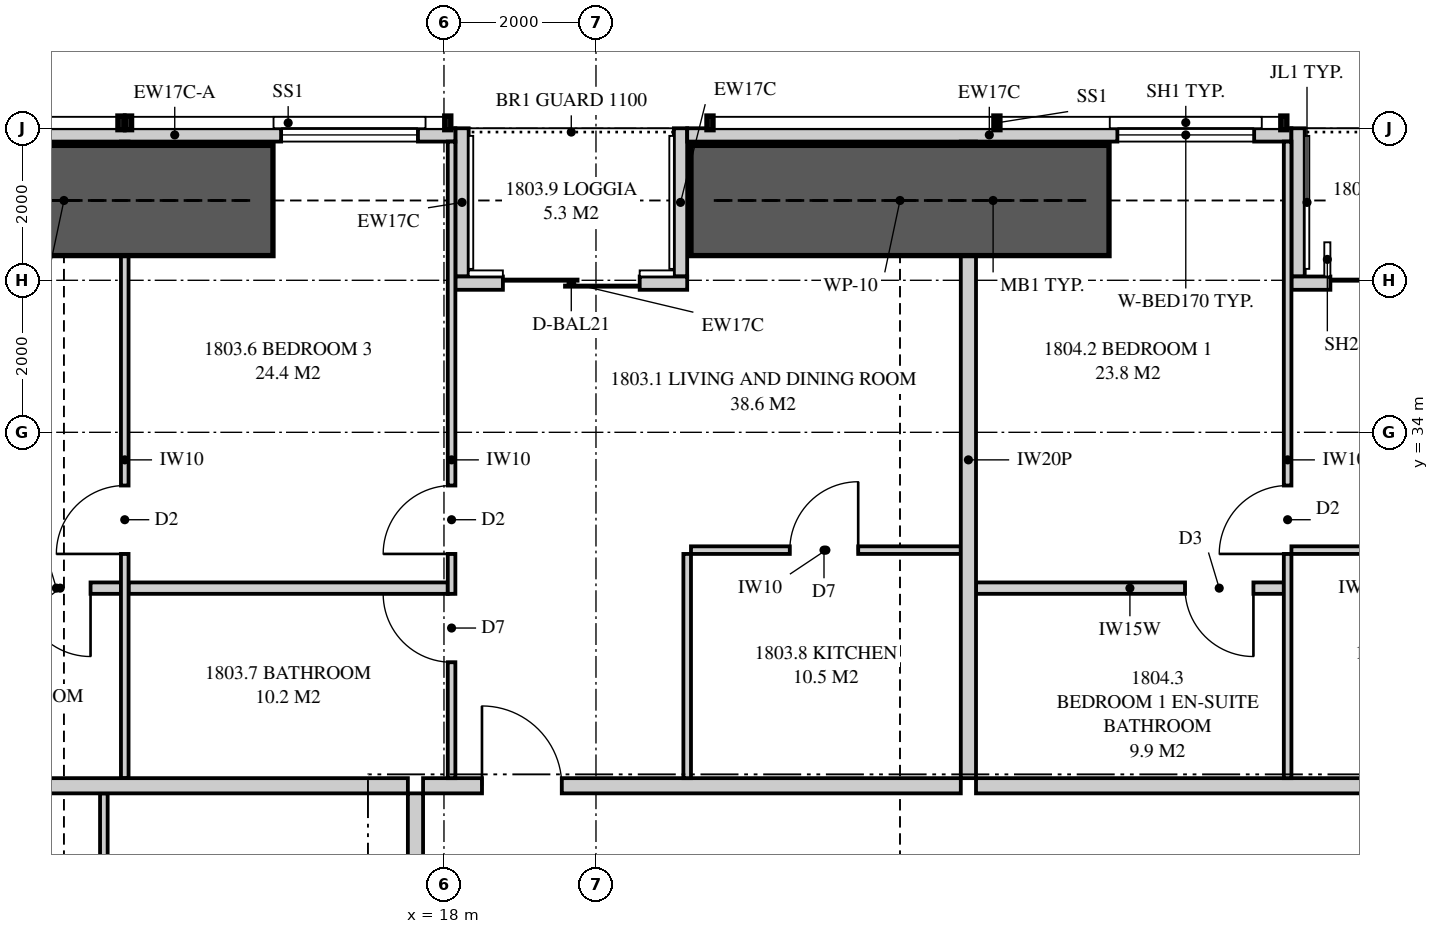
"""IFC4 building model, lengths in metres.
Left out: names, types, materials, properties, quantities, classifications, styles, units other than length and angle.
Written with IfcOpenShell. Run it as: python <this file> out.ifc"""

import sys

from ifc_helpers import new_model, si_unit, direction, frame, frame_2d, origin, place, context, subcontext, project, spatial, polyline, rectangle, outline, extrude, element, fill, save


model = new_model("IFC4")
c1 = context("Model", 3, precision=1e-05, world=origin(), true_north=direction((0.0, 1.0)))
c2 = subcontext(c1, "Body", "Model", "MODEL_VIEW")
j1 = project(units=[si_unit("LENGTHUNIT", "METRE"), si_unit("PLANEANGLEUNIT", "RADIAN")], contexts=[c1])
p1 = place(None, origin())
s1 = spatial("IfcSite", under=j1, at=p1, CompositionType="ELEMENT")
p2 = place(p1, origin())
s2 = spatial("IfcBuilding", under=s1, at=p2, CompositionType="ELEMENT")
p3 = place(p2, frame((0.0, 0.0, 67.9)))
s3 = spatial("IfcBuildingStorey", under=s2, at=p3, CompositionType="ELEMENT", Elevation=67.9)
p4 = place(p3, frame((29.15, 37.913, 0.0), z_axis=(0.0, 0.0, 1.0), x_axis=(-1.0, 0.0, 0.0)))
e1 = element("IfcWall", 1, at=p4, inside=s3, PredefinedType="SOLIDWALL", context=c2, shape_type="SweptSolid", body=[
    extrude(rectangle(XDim=7.95, YDim=0.175, at=frame_2d((3.975, 0.0))), origin(), (0.0, 0.0, 1.0), 2.15),
])
p5 = place(p4, frame((0.49, 0.0, 0.4)))
e2 = element("IfcOpeningElement", 2, at=p5, cuts=e1, PredefinedType="OPENING", context=c2, shape_type="SweptSolid", body=[
    extrude(rectangle(XDim=1.8, YDim=1.7, at=frame_2d((0.9, 0.85))), frame((0.0, 0.097, 0.0), z_axis=(0.0, -1.0, 0.0), x_axis=(1.0, 0.0, 0.0)), (0.0, 0.0, 1.0), 0.195),
])
p6 = place(p3, frame((18.15, 37.913, 0.0), z_axis=(0.0, 0.0, 1.0), x_axis=(-1.0, 0.0, 0.0)))
e3 = element("IfcWall", 3, at=p6, inside=s3, PredefinedType="SOLIDWALL", context=c2, shape_type="SweptSolid", body=[
    extrude(rectangle(XDim=7.385, YDim=0.175, at=frame_2d((3.692, 0.0))), origin(), (0.0, 0.0, 1.0), 2.15),
])
p7 = place(p6, frame((0.492, 0.0, 0.4)))
e4 = element("IfcOpeningElement", 4, at=p7, cuts=e3, PredefinedType="OPENING", context=c2, shape_type="SweptSolid", body=[
    extrude(rectangle(XDim=1.8, YDim=1.7, at=frame_2d((0.9, 0.85))), frame((0.0, 0.097, 0.0), z_axis=(0.0, -1.0, 0.0), x_axis=(1.0, 0.0, 0.0)), (0.0, 0.0, 1.0), 0.195),
])
p8 = place(p3, frame((31.975, 35.962, 0.0), z_axis=(0.0, 0.0, 1.0), x_axis=(-1.0, 0.0, 0.0)))
e5 = element("IfcWall", 5, at=p8, inside=s3, PredefinedType="SOLIDWALL", context=c2, shape_type="SweptSolid", body=[
    extrude(rectangle(XDim=2.825, YDim=0.175, at=frame_2d((1.413, 0.0))), origin(), (0.0, 0.0, 1.0), 2.15),
])
p9 = place(p8, frame((0.512, 0.0, 0.0)))
e6 = element("IfcOpeningElement", 6, at=p9, cuts=e5, PredefinedType="OPENING", context=c2, shape_type="SweptSolid", body=[
    extrude(rectangle(XDim=1.8, YDim=2.1, at=frame_2d((0.9, 1.05))), frame((0.0, 0.097, 0.0), z_axis=(0.0, -1.0, 0.0), x_axis=(1.0, 0.0, 0.0)), (0.0, 0.0, 1.0), 0.195),
])
p10 = place(p3, frame((29.238, 38.0, 0.0), z_axis=(0.0, 0.0, 1.0), x_axis=(0.0, -1.0, 0.0)))
e7 = element("IfcWall", 7, at=p10, inside=s3, PredefinedType="SOLIDWALL", context=c2, shape_type="SweptSolid", body=[
    extrude(rectangle(XDim=1.95, YDim=0.175, at=frame_2d((0.975, 0.0))), origin(), (0.0, 0.0, 1.0), 2.15),
])
p11 = place(p3, frame((21.2, 35.962, 0.0), z_axis=(0.0, 0.0, 1.0), x_axis=(-1.0, 0.0, 0.0)))
e8 = element("IfcWall", 8, at=p11, inside=s3, PredefinedType="SOLIDWALL", context=c2, shape_type="SweptSolid", body=[
    extrude(rectangle(XDim=3.05, YDim=0.175, at=frame_2d((1.525, 0.0))), origin(), (0.0, 0.0, 1.0), 2.15),
])
p12 = place(p11, frame((0.625, 0.0, 0.0)))
e9 = element("IfcOpeningElement", 9, at=p12, cuts=e8, PredefinedType="OPENING", context=c2, shape_type="SweptSolid", body=[
    extrude(rectangle(XDim=1.8, YDim=2.1, at=frame_2d((0.9, 1.05))), frame((0.0, 0.097, 0.0), z_axis=(0.0, -1.0, 0.0), x_axis=(1.0, 0.0, 0.0)), (0.0, 0.0, 1.0), 0.195),
])
for number, where, z_axis, x_axis in (
    (10, (21.113, 38.0, 0.0), (0.0, 0.0, 1.0), (0.0, -1.0, 0.0)),
    (11, (18.238, 38.0, 0.0), (0.0, 0.0, 1.0), (0.0, -1.0, 0.0)),
):
    element("IfcWall", number, at=place(p3, frame(where, z_axis=z_axis, x_axis=x_axis)), inside=s3, PredefinedType="SOLIDWALL", context=c2, shape_type="SweptSolid", body=[
        extrude(rectangle(XDim=1.95, YDim=0.175, at=frame_2d((0.975, 0.0))), origin(), (0.0, 0.0, 1.0), 2.15),
    ])
p13 = place(p3, frame((24.9, 37.825, 0.0), z_axis=(0.0, 0.0, 1.0), x_axis=(0.0, -1.0, 0.0)))
e12 = element("IfcWall", 12, at=p13, inside=s3, PredefinedType="PARTITIONING", context=c2, shape_type="SweptSolid", body=[
    extrude(outline(polyline([(0.529, 2.15), (0.0, 2.15), (0.0, 0.0), (0.529, 0.0), (0.529, 0.889), (1.021, 0.889), (1.021, 0.0), (8.375, 0.0), (8.375, 3.11), (2.085, 3.11), (2.085, 2.15), (1.021, 2.15), (1.021, 1.261), (0.529, 1.261), (0.529, 2.15)])), frame((0.0, 0.1, 0.0), z_axis=(0.0, -1.0, 0.0), x_axis=(1.0, 0.0, 0.0)), (0.0, 0.0, 1.0), 0.2),
])
p14 = place(p3, frame((17.725, 29.35, 0.0), z_axis=(0.0, 0.0, 1.0), x_axis=(1.0, 0.0, 0.0)))
e13 = element("IfcWall", 13, at=p14, inside=s3, PredefinedType="PARTITIONING", context=c2, shape_type="SweptSolid", body=[
    extrude(outline(polyline([(0.0, 0.0), (7.075, 0.0), (7.075, 3.11), (6.612, 3.11), (6.612, 2.541), (5.938, 2.541), (5.938, 3.11), (0.0, 3.11), (0.0, 0.0)])), frame((0.0, 0.1, 0.0), z_axis=(0.0, -1.0, 0.0), x_axis=(1.0, 0.0, 0.0)), (0.0, 0.0, 1.0), 0.2),
])
p15 = place(p14, frame((0.775, 0.0, 0.0)))
e14 = element("IfcOpeningElement", 14, at=p15, cuts=e13, PredefinedType="OPENING", context=c2, shape_type="SweptSolid", body=[
    extrude(rectangle(XDim=1.05, YDim=2.2, at=frame_2d((0.525, 1.1))), frame((0.0, 0.11, 0.0), z_axis=(0.0, -1.0, 0.0), x_axis=(1.0, 0.0, 0.0)), (0.0, 0.0, 1.0), 0.22),
])
p16 = place(p3, frame((13.8, 37.825, 0.0), z_axis=(0.0, 0.0, 1.0), x_axis=(0.0, -1.0, 0.0)))
e15 = element("IfcWall", 15, at=p16, inside=s3, PredefinedType="PARTITIONING", context=c2, shape_type="SweptSolid", body=[
    extrude(outline(polyline([(2.035, 2.15), (0.0, 2.15), (0.0, 0.0), (8.375, 0.0), (8.375, 3.11), (2.035, 3.11), (2.035, 2.15)]), holes=[polyline([(1.021, 0.133), (0.529, 0.133), (0.529, 0.923), (1.021, 0.923), (1.021, 0.133)]), polyline([(1.021, 1.227), (0.529, 1.227), (0.529, 2.017), (1.021, 2.017), (1.021, 1.227)])]), frame((0.0, 0.05, 0.0), z_axis=(0.0, -1.0, 0.0), x_axis=(1.0, 0.0, 0.0)), (0.0, 0.0, 1.0), 0.1),
])
p17 = place(p16, frame((4.525, 0.0, 0.0)))
e16 = element("IfcOpeningElement", 16, at=p17, cuts=e15, PredefinedType="OPENING", context=c2, shape_type="SweptSolid", body=[
    extrude(rectangle(XDim=0.9, YDim=2.1, at=frame_2d((0.45, 1.05))), frame((0.0, 0.06, 0.0), z_axis=(0.0, -1.0, 0.0), x_axis=(1.0, 0.0, 0.0)), (0.0, 0.0, 1.0), 0.12),
])
p18 = place(p3, frame((18.1, 37.825, 0.0), z_axis=(0.0, 0.0, 1.0), x_axis=(0.0, -1.0, 0.0)))
e17 = element("IfcWall", 17, at=p18, inside=s3, PredefinedType="PARTITIONING", context=c2, shape_type="SweptSolid", body=[
    extrude(outline(polyline([(0.0, 0.0), (8.375, 0.0), (8.375, 3.11), (2.035, 3.11), (2.035, 2.15), (0.0, 2.15), (0.0, 3.11), (0.0, 0.0)])), frame((0.0, 0.05, 0.0), z_axis=(0.0, -1.0, 0.0), x_axis=(1.0, 0.0, 0.0)), (0.0, 0.0, 1.0), 0.1),
])
p19 = place(p18, frame((4.525, 0.0, 0.0)))
e18 = element("IfcOpeningElement", 18, at=p19, cuts=e17, PredefinedType="OPENING", context=c2, shape_type="SweptSolid", body=[
    extrude(rectangle(XDim=0.9, YDim=2.1, at=frame_2d((0.45, 1.05))), frame((0.0, 0.06, 0.0), z_axis=(0.0, -1.0, 0.0), x_axis=(1.0, 0.0, 0.0)), (0.0, 0.0, 1.0), 0.12),
])
p20 = place(p18, frame((5.95, 0.0, 0.0)))
e19 = element("IfcOpeningElement", 19, at=p20, cuts=e17, PredefinedType="OPENING", context=c2, shape_type="SweptSolid", body=[
    extrude(rectangle(XDim=0.9, YDim=2.1, at=frame_2d((0.45, 1.05))), frame((0.0, 0.06, 0.0), z_axis=(0.0, -1.0, 0.0), x_axis=(1.0, 0.0, 0.0)), (0.0, 0.0, 1.0), 0.12),
])
p21 = place(p3, frame((7.85, 31.95, 0.0), z_axis=(0.0, 0.0, 1.0), x_axis=(1.0, 0.0, 0.0)))
e20 = element("IfcWall", 20, at=p21, inside=s3, PredefinedType="PLUMBINGWALL", context=c2, shape_type="SweptSolid", body=[
    extrude(outline(polyline([(0.0, 0.0), (5.9, 0.0), (5.9, 3.11), (5.462, 3.11), (5.462, 2.541), (4.838, 2.541), (4.838, 3.11), (3.635, 3.11), (3.635, 2.51), (1.065, 2.51), (1.065, 3.11), (0.0, 3.11), (0.0, 0.0)])), frame((0.0, 0.075, 0.0), z_axis=(0.0, -1.0, 0.0), x_axis=(1.0, 0.0, 0.0)), (0.0, 0.0, 1.0), 0.15),
])
p22 = place(p21, frame((4.6, 0.0, 0.0)))
e21 = element("IfcOpeningElement", 21, at=p22, cuts=e20, PredefinedType="OPENING", context=c2, shape_type="SweptSolid", body=[
    extrude(rectangle(XDim=0.9, YDim=2.1, at=frame_2d((0.45, 1.05))), frame((0.0, 0.085, 0.0), z_axis=(0.0, -1.0, 0.0), x_axis=(1.0, 0.0, 0.0)), (0.0, 0.0, 1.0), 0.17),
])
p23 = place(p3, frame((13.85, 31.95, 0.0), z_axis=(0.0, 0.0, 1.0), x_axis=(1.0, 0.0, 0.0)))
e22 = element("IfcWall", 22, at=p23, inside=s3, PredefinedType="PLUMBINGWALL", context=c2, shape_type="SweptSolid", body=[
    extrude(rectangle(XDim=4.2, YDim=0.15, at=frame_2d((2.1, 0.0))), origin(), (0.0, 0.0, 1.0), 3.11),
])
p24 = place(p3, frame((21.25, 32.45, 0.0), z_axis=(0.0, 0.0, 1.0), x_axis=(1.0, 0.0, 0.0)))
e23 = element("IfcWall", 23, at=p24, inside=s3, PredefinedType="PARTITIONING", context=c2, shape_type="SweptSolid", body=[
    extrude(outline(polyline([(0.0, 0.0), (3.55, 0.0), (3.55, 3.11), (3.037, 3.11), (3.037, 2.541), (2.463, 2.541), (2.463, 3.11), (0.0, 3.11), (0.0, 0.0)])), frame((0.0, 0.05, 0.0), z_axis=(0.0, -1.0, 0.0), x_axis=(1.0, 0.0, 0.0)), (0.0, 0.0, 1.0), 0.1),
])
p25 = place(p24, frame((1.3, 0.0, 0.0)))
e24 = element("IfcOpeningElement", 24, at=p25, cuts=e23, PredefinedType="OPENING", context=c2, shape_type="SweptSolid", body=[
    extrude(rectangle(XDim=0.9, YDim=2.1, at=frame_2d((0.45, 1.05))), frame((0.0, 0.06, 0.0), z_axis=(0.0, -1.0, 0.0), x_axis=(1.0, 0.0, 0.0)), (0.0, 0.0, 1.0), 0.12),
])
p26 = place(p3, frame((21.2, 32.4, 0.0), z_axis=(0.0, 0.0, 1.0), x_axis=(0.0, -1.0, 0.0)))
e25 = element("IfcWall", 25, at=p26, inside=s3, PredefinedType="PARTITIONING", context=c2, shape_type="SweptSolid", body=[
    extrude(rectangle(XDim=2.95, YDim=0.1, at=frame_2d((1.475, 0.0))), origin(), (0.0, 0.0, 1.0), 3.11),
])
p27 = place(p3, frame((25.0, 29.35, 0.0), z_axis=(0.0, 0.0, 1.0), x_axis=(1.0, 0.0, 0.0)))
e26 = element("IfcWall", 26, at=p27, inside=s3, PredefinedType="PARTITIONING", context=c2, shape_type="SweptSolid", body=[
    extrude(rectangle(XDim=9.05, YDim=0.2, at=frame_2d((4.525, 0.0))), origin(), (0.0, 0.0, 1.0), 3.11),
])
p28 = place(p3, frame((29.1, 37.825, 0.0), z_axis=(0.0, 0.0, 1.0), x_axis=(0.0, -1.0, 0.0)))
e27 = element("IfcWall", 27, at=p28, inside=s3, PredefinedType="PARTITIONING", context=c2, shape_type="SweptSolid", body=[
    extrude(outline(polyline([(0.0, 0.0), (8.375, 0.0), (8.375, 3.11), (2.035, 3.11), (2.035, 2.15), (0.0, 2.15), (0.0, 3.11), (0.0, 0.0)])), frame((0.0, 0.05, 0.0), z_axis=(0.0, -1.0, 0.0), x_axis=(1.0, 0.0, 0.0)), (0.0, 0.0, 1.0), 0.1),
])
p29 = place(p28, frame((4.525, 0.0, 0.0)))
e28 = element("IfcOpeningElement", 28, at=p29, cuts=e27, PredefinedType="OPENING", context=c2, shape_type="SweptSolid", body=[
    extrude(rectangle(XDim=0.9, YDim=2.1, at=frame_2d((0.45, 1.05))), frame((0.0, 0.06, 0.0), z_axis=(0.0, -1.0, 0.0), x_axis=(1.0, 0.0, 0.0)), (0.0, 0.0, 1.0), 0.12),
])
p30 = place(p3, frame((25.0, 31.95, 0.0), z_axis=(0.0, 0.0, 1.0), x_axis=(1.0, 0.0, 0.0)))
e29 = element("IfcWall", 29, at=p30, inside=s3, PredefinedType="PLUMBINGWALL", context=c2, shape_type="SweptSolid", body=[
    extrude(rectangle(XDim=4.05, YDim=0.15, at=frame_2d((2.025, 0.0))), origin(), (0.0, 0.0, 1.0), 3.11),
])
p31 = place(p30, frame((2.75, 0.0, 0.0)))
e30 = element("IfcOpeningElement", 30, at=p31, cuts=e29, PredefinedType="OPENING", context=c2, shape_type="SweptSolid", body=[
    extrude(rectangle(XDim=0.9, YDim=2.1, at=frame_2d((0.45, 1.05))), frame((0.0, 0.085, 0.0), z_axis=(0.0, -1.0, 0.0), x_axis=(1.0, 0.0, 0.0)), (0.0, 0.0, 1.0), 0.17),
])
p32 = place(p3, frame((29.15, 32.45, 0.0), z_axis=(0.0, 0.0, 1.0), x_axis=(1.0, 0.0, 0.0)))
e31 = element("IfcWall", 31, at=p32, inside=s3, PredefinedType="PARTITIONING", context=c2, shape_type="SweptSolid", body=[
    extrude(rectangle(XDim=3.55, YDim=0.1, at=frame_2d((1.775, 0.0))), origin(), (0.0, 0.0, 1.0), 3.11),
])
p33 = place(p32, frame((1.35, 0.0, 0.0)))
e32 = element("IfcOpeningElement", 32, at=p33, cuts=e31, PredefinedType="OPENING", context=c2, shape_type="SweptSolid", body=[
    extrude(rectangle(XDim=0.9, YDim=2.1, at=frame_2d((0.45, 1.05))), frame((0.0, 0.06, 0.0), z_axis=(0.0, -1.0, 0.0), x_axis=(1.0, 0.0, 0.0)), (0.0, 0.0, 1.0), 0.12),
])
p34 = place(p3, frame((2.0, 29.35, 0.0), z_axis=(0.0, 0.0, 1.0), x_axis=(1.0, 0.0, 0.0)))
e33 = element("IfcWall", 33, at=p34, inside=s3, PredefinedType="PARTITIONING", context=c2, shape_type="SweptSolid", body=[
    extrude(outline(polyline([(0.0, 0.0), (15.525, 0.0), (15.525, 3.11), (11.337, 3.11), (11.337, 2.541), (10.663, 2.541), (10.663, 3.11), (9.51, 3.11), (9.51, 2.51), (6.89, 2.51), (6.89, 3.11), (2.982, 3.11), (2.982, 2.15), (0.328, 2.15), (0.328, 3.11), (0.0, 3.11), (0.0, 0.0)])), frame((0.0, 0.1, 0.0), z_axis=(0.0, -1.0, 0.0), x_axis=(1.0, 0.0, 0.0)), (0.0, 0.0, 1.0), 0.2),
])
p35 = place(p3, frame((17.625, 14.1, 0.0), z_axis=(0.0, 0.0, 1.0), x_axis=(0.0, 1.0, 0.0)))
e34 = element("IfcWall", 34, at=p35, inside=s3, PredefinedType="PARTITIONING", context=c2, shape_type="SweptSolid", body=[
    extrude(outline(polyline([(0.0, 0.0), (15.15, 0.0), (15.15, 3.11), (11.237, 3.11), (11.237, 2.541), (10.562, 2.541), (10.562, 3.11), (0.0, 3.11), (0.0, 0.0)])), frame((0.0, 0.1, 0.0), z_axis=(0.0, -1.0, 0.0), x_axis=(1.0, 0.0, 0.0)), (0.0, 0.0, 1.0), 0.2),
])
p36 = place(p35, frame((7.075, 0.0, 0.0)))
e35 = element("IfcOpeningElement", 35, at=p36, cuts=e34, PredefinedType="OPENING", context=c2, shape_type="SweptSolid", body=[
    extrude(rectangle(XDim=1.05, YDim=2.2, at=frame_2d((0.525, 1.1))), frame((0.0, 0.11, 0.0), z_axis=(0.0, -1.0, 0.0), x_axis=(1.0, 0.0, 0.0)), (0.0, 0.0, 1.0), 0.22),
])
p37 = place(p3, frame((13.525, 18.15, 0.0), z_axis=(0.0, 0.0, 1.0), x_axis=(0.0, 1.0, 0.0)))
e36 = element("IfcWall", 36, at=p37, inside=s3, PredefinedType="PARTITIONING", context=c2, shape_type="SweptSolid", body=[
    extrude(outline(polyline([(0.0, 0.0), (11.1, 0.0), (11.1, 3.11), (7.137, 3.11), (7.137, 2.541), (6.563, 2.541), (6.563, 3.11), (0.0, 3.11), (0.0, 0.0)])), frame((0.0, 0.05, 0.0), z_axis=(0.0, -1.0, 0.0), x_axis=(1.0, 0.0, 0.0)), (0.0, 0.0, 1.0), 0.1),
])
p38 = place(p37, frame((3.025, 0.0, 0.0)))
e37 = element("IfcOpeningElement", 37, at=p38, cuts=e36, PredefinedType="OPENING", context=c2, shape_type="SweptSolid", body=[
    extrude(rectangle(XDim=1.0, YDim=2.1, at=frame_2d((0.5, 1.05))), frame((0.0, 0.06, 0.0), z_axis=(0.0, -1.0, 0.0), x_axis=(1.0, 0.0, 0.0)), (0.0, 0.0, 1.0), 0.12),
])
for number, where, z_axis, x_axis in (
    (38, (21.25, 37.05, 0.0), (0.0, 0.0, 1.0), (1.0, 0.0, 0.0)),
    (39, (10.25, 37.05, 0.0), (0.0, 0.0, 1.0), (1.0, 0.0, 0.0)),
):
    element("IfcWall", number, at=place(p3, frame(where, z_axis=z_axis, x_axis=x_axis)), inside=s3, PredefinedType="SHEAR", context=c2, shape_type="SweptSolid", body=[
        extrude(rectangle(XDim=5.5, YDim=1.45, at=frame_2d((2.75, 0.0))), origin(), (0.0, 0.0, 1.0), 3.35),
    ])
p39 = place(p9, origin())
e40 = element("IfcDoor", 40, at=p39, inside=s3, OperationType="SLIDING_TO_LEFT", PredefinedType="DOOR", context=c2, shape_type="SweptSolid", body=[
    extrude(rectangle(XDim=1.8, YDim=2.1, at=frame_2d((0.9, 1.05))), frame((0.0, 0.025, 0.0), z_axis=(0.0, -1.0, 0.0), x_axis=(1.0, 0.0, 0.0)), (0.0, 0.0, 1.0), 0.05),
])
fill(e6, e40)
p40 = place(p5, origin())
e41 = element("IfcWindow", 41, at=p40, inside=s3, PartitioningType="SINGLE_PANEL", PredefinedType="WINDOW", context=c2, shape_type="SweptSolid", body=[
    extrude(rectangle(XDim=1.8, YDim=1.7, at=frame_2d((0.9, 0.85))), frame((0.0, 0.03, 0.0), z_axis=(0.0, -1.0, 0.0), x_axis=(1.0, 0.0, 0.0)), (0.0, 0.0, 1.0), 0.06),
])
fill(e2, e41)
p41 = place(p12, origin())
e42 = element("IfcDoor", 42, at=p41, inside=s3, OperationType="SLIDING_TO_LEFT", PredefinedType="DOOR", context=c2, shape_type="SweptSolid", body=[
    extrude(rectangle(XDim=1.8, YDim=2.1, at=frame_2d((0.9, 1.05))), frame((0.0, 0.025, 0.0), z_axis=(0.0, -1.0, 0.0), x_axis=(1.0, 0.0, 0.0)), (0.0, 0.0, 1.0), 0.05),
])
fill(e9, e42)
p42 = place(p7, origin())
e43 = element("IfcWindow", 43, at=p42, inside=s3, PartitioningType="SINGLE_PANEL", PredefinedType="WINDOW", context=c2, shape_type="SweptSolid", body=[
    extrude(rectangle(XDim=1.8, YDim=1.7, at=frame_2d((0.9, 0.85))), frame((0.0, 0.03, 0.0), z_axis=(0.0, -1.0, 0.0), x_axis=(1.0, 0.0, 0.0)), (0.0, 0.0, 1.0), 0.06),
])
fill(e4, e43)
p43 = place(p15, origin())
e44 = element("IfcDoor", 44, at=p43, inside=s3, OperationType="SINGLE_SWING_LEFT", PredefinedType="DOOR", context=c2, shape_type="SweptSolid", body=[
    extrude(rectangle(XDim=1.05, YDim=2.2, at=frame_2d((0.525, 1.1))), frame((0.0, 0.025, 0.0), z_axis=(0.0, -1.0, 0.0), x_axis=(1.0, 0.0, 0.0)), (0.0, 0.0, 1.0), 0.05),
])
fill(e14, e44)
p44 = place(p17, frame((0.9, 0.0, 0.0), z_axis=(0.0, 0.0, 1.0), x_axis=(-1.0, 0.0, 0.0)))
e45 = element("IfcDoor", 45, at=p44, inside=s3, OperationType="SINGLE_SWING_LEFT", PredefinedType="DOOR", context=c2, shape_type="SweptSolid", body=[
    extrude(rectangle(XDim=0.9, YDim=2.1, at=frame_2d((0.45, 1.05))), frame((0.0, 0.025, 0.0), z_axis=(0.0, -1.0, 0.0), x_axis=(1.0, 0.0, 0.0)), (0.0, 0.0, 1.0), 0.05),
])
fill(e16, e45)
p45 = place(p22, frame((0.9, 0.0, 0.0), z_axis=(0.0, 0.0, 1.0), x_axis=(-1.0, 0.0, 0.0)))
e46 = element("IfcDoor", 46, at=p45, inside=s3, OperationType="SINGLE_SWING_LEFT", PredefinedType="DOOR", context=c2, shape_type="SweptSolid", body=[
    extrude(rectangle(XDim=0.9, YDim=2.1, at=frame_2d((0.45, 1.05))), frame((0.0, 0.025, 0.0), z_axis=(0.0, -1.0, 0.0), x_axis=(1.0, 0.0, 0.0)), (0.0, 0.0, 1.0), 0.05),
])
fill(e21, e46)
p46 = place(p19, frame((0.9, 0.0, 0.0), z_axis=(0.0, 0.0, 1.0), x_axis=(-1.0, 0.0, 0.0)))
e47 = element("IfcDoor", 47, at=p46, inside=s3, OperationType="SINGLE_SWING_LEFT", PredefinedType="DOOR", context=c2, shape_type="SweptSolid", body=[
    extrude(rectangle(XDim=0.9, YDim=2.1, at=frame_2d((0.45, 1.05))), frame((0.0, 0.025, 0.0), z_axis=(0.0, -1.0, 0.0), x_axis=(1.0, 0.0, 0.0)), (0.0, 0.0, 1.0), 0.05),
])
fill(e18, e47)
p47 = place(p20, frame((0.9, 0.0, 0.0), z_axis=(0.0, 0.0, 1.0), x_axis=(-1.0, 0.0, 0.0)))
e48 = element("IfcDoor", 48, at=p47, inside=s3, OperationType="SINGLE_SWING_RIGHT", PredefinedType="DOOR", context=c2, shape_type="SweptSolid", body=[
    extrude(rectangle(XDim=0.9, YDim=2.1, at=frame_2d((0.45, 1.05))), frame((0.0, 0.025, 0.0), z_axis=(0.0, -1.0, 0.0), x_axis=(1.0, 0.0, 0.0)), (0.0, 0.0, 1.0), 0.05),
])
fill(e19, e48)
p48 = place(p25, origin())
e49 = element("IfcDoor", 49, at=p48, inside=s3, OperationType="SINGLE_SWING_RIGHT", PredefinedType="DOOR", context=c2, shape_type="SweptSolid", body=[
    extrude(rectangle(XDim=0.9, YDim=2.1, at=frame_2d((0.45, 1.05))), frame((0.0, 0.025, 0.0), z_axis=(0.0, -1.0, 0.0), x_axis=(1.0, 0.0, 0.0)), (0.0, 0.0, 1.0), 0.05),
])
fill(e24, e49)
p49 = place(p29, frame((0.9, 0.0, 0.0), z_axis=(0.0, 0.0, 1.0), x_axis=(-1.0, 0.0, 0.0)))
e50 = element("IfcDoor", 50, at=p49, inside=s3, OperationType="SINGLE_SWING_LEFT", PredefinedType="DOOR", context=c2, shape_type="SweptSolid", body=[
    extrude(rectangle(XDim=0.9, YDim=2.1, at=frame_2d((0.45, 1.05))), frame((0.0, 0.025, 0.0), z_axis=(0.0, -1.0, 0.0), x_axis=(1.0, 0.0, 0.0)), (0.0, 0.0, 1.0), 0.05),
])
fill(e28, e50)
p50 = place(p31, frame((0.9, 0.0, 0.0), z_axis=(0.0, 0.0, 1.0), x_axis=(-1.0, 0.0, 0.0)))
e51 = element("IfcDoor", 51, at=p50, inside=s3, OperationType="SINGLE_SWING_LEFT", PredefinedType="DOOR", context=c2, shape_type="SweptSolid", body=[
    extrude(rectangle(XDim=0.9, YDim=2.1, at=frame_2d((0.45, 1.05))), frame((0.0, 0.025, 0.0), z_axis=(0.0, -1.0, 0.0), x_axis=(1.0, 0.0, 0.0)), (0.0, 0.0, 1.0), 0.05),
])
fill(e30, e51)
save(model, sys.argv[1])
